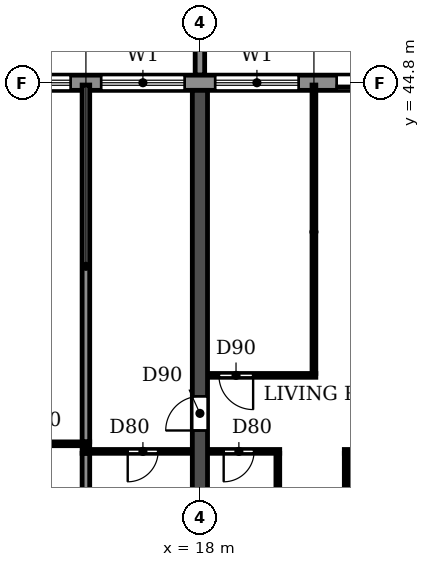
"""IFC4 building model, lengths in metres.
Left out: names, types, materials, properties, quantities, classifications, styles, units other than length and angle.
Written with IfcOpenShell. Run it as: python <this file> out.ifc"""

import sys

from ifc_helpers import new_model, si_unit, direction, frame, frame_2d, origin, place, context, subcontext, project, spatial, polyline, rectangle, outline, extrude, source, transform, mapped, element, fill, save


model = new_model("IFC4")
c1 = context("Model", 3, precision=1e-05, world=origin(), true_north=direction((0.0, 1.0)))
c2 = subcontext(c1, "Body", "Model", "MODEL_VIEW")
j1 = project(units=[si_unit("LENGTHUNIT", "METRE"), si_unit("PLANEANGLEUNIT", "RADIAN")], contexts=[c1])
p1 = place(None, origin())
s1 = spatial("IfcSite", under=j1, at=p1, CompositionType="ELEMENT")
p2 = place(p1, origin())
s2 = spatial("IfcBuilding", under=s1, at=p2, CompositionType="ELEMENT")
p3 = place(p2, frame((0.0, 0.0, 43.2)))
s3 = spatial("IfcBuildingStorey", under=s2, at=p3, CompositionType="ELEMENT", Elevation=43.2)
p4 = place(p3, frame((18.0, 30.55, 0.0), z_axis=(0.0, 0.0, 1.0), x_axis=(0.0, 1.0, 0.0)))
e1 = element("IfcWall", 1, at=p4, inside=s3, PredefinedType="SHEAR", context=c2, shape_type="SweptSolid", body=[
    extrude(rectangle(XDim=14.05, YDim=0.4, at=frame_2d((7.025, 0.0))), origin(), (0.0, 0.0, 1.0), 3.05),
])
p5 = place(p4, frame((5.1, 0.0, 0.0)))
e2 = element("IfcOpeningElement", 2, at=p5, cuts=e1, PredefinedType="OPENING", context=c2, shape_type="SweptSolid", body=[
    extrude(rectangle(XDim=0.9, YDim=2.1, at=frame_2d((0.45, 1.05))), frame((0.0, 0.21, 0.0), z_axis=(0.0, -1.0, 0.0), x_axis=(1.0, 0.0, 0.0)), (0.0, 0.0, 1.0), 0.42),
])
p6 = place(p3, frame((97.317, 44.8, 0.0), z_axis=(0.0, 0.0, 1.0), x_axis=(-1.0, 0.0, 0.0)))
e3 = element("IfcWall", 3, at=p6, inside=s3, PredefinedType="STANDARD", context=c2, shape_type="SweptSolid", body=[
    extrude(rectangle(XDim=92.634, YDim=0.4, at=frame_2d((46.317, 0.0))), origin(), (0.0, 0.0, 1.0), 3.05),
])
p7 = place(p6, frame((88.917, 0.0, 0.0)))
e4 = element("IfcOpeningElement", 4, at=p7, cuts=e3, PredefinedType="OPENING", context=c2, shape_type="SweptSolid", body=[
    extrude(rectangle(XDim=1.8, YDim=2.4, at=frame_2d((0.9, 1.2))), frame((0.0, 0.21, 0.0), z_axis=(0.0, -1.0, 0.0), x_axis=(1.0, 0.0, 0.0)), (0.0, 0.0, 1.0), 0.42),
])
p8 = place(p6, frame((85.717, 0.0, 0.9)))
e5 = element("IfcOpeningElement", 5, at=p8, cuts=e3, PredefinedType="OPENING", context=c2, shape_type="SweptSolid", body=[
    extrude(rectangle(XDim=2.2, YDim=1.5, at=frame_2d((1.1, 0.75))), frame((0.0, 0.21, 0.0), z_axis=(0.0, -1.0, 0.0), x_axis=(1.0, 0.0, 0.0)), (0.0, 0.0, 1.0), 0.42),
])
p9 = place(p6, frame((82.717, 0.0, 0.9)))
e6 = element("IfcOpeningElement", 6, at=p9, cuts=e3, PredefinedType="OPENING", context=c2, shape_type="SweptSolid", body=[
    extrude(rectangle(XDim=2.2, YDim=1.5, at=frame_2d((1.1, 0.75))), frame((0.0, 0.21, 0.0), z_axis=(0.0, -1.0, 0.0), x_axis=(1.0, 0.0, 0.0)), (0.0, 0.0, 1.0), 0.42),
])
p10 = place(p6, frame((79.717, 0.0, 0.9)))
e7 = element("IfcOpeningElement", 7, at=p10, cuts=e3, PredefinedType="OPENING", context=c2, shape_type="SweptSolid", body=[
    extrude(rectangle(XDim=2.2, YDim=1.5, at=frame_2d((1.1, 0.75))), frame((0.0, 0.21, 0.0), z_axis=(0.0, -1.0, 0.0), x_axis=(1.0, 0.0, 0.0)), (0.0, 0.0, 1.0), 0.42),
])
p11 = place(p6, frame((76.717, 0.0, 0.9)))
e8 = element("IfcOpeningElement", 8, at=p11, cuts=e3, PredefinedType="OPENING", context=c2, shape_type="SweptSolid", body=[
    extrude(rectangle(XDim=2.2, YDim=1.5, at=frame_2d((1.1, 0.75))), frame((0.0, 0.21, 0.0), z_axis=(0.0, -1.0, 0.0), x_axis=(1.0, 0.0, 0.0)), (0.0, 0.0, 1.0), 0.42),
])
p12 = place(p6, frame((73.917, 0.0, 0.0)))
e9 = element("IfcOpeningElement", 9, at=p12, cuts=e3, PredefinedType="OPENING", context=c2, shape_type="SweptSolid", body=[
    extrude(rectangle(XDim=1.8, YDim=2.4, at=frame_2d((0.9, 1.2))), frame((0.0, 0.21, 0.0), z_axis=(0.0, -1.0, 0.0), x_axis=(1.0, 0.0, 0.0)), (0.0, 0.0, 1.0), 0.42),
])
p13 = place(p6, frame((70.717, 0.0, 0.9)))
e10 = element("IfcOpeningElement", 10, at=p13, cuts=e3, PredefinedType="OPENING", context=c2, shape_type="SweptSolid", body=[
    extrude(rectangle(XDim=2.2, YDim=1.5, at=frame_2d((1.1, 0.75))), frame((0.0, 0.21, 0.0), z_axis=(0.0, -1.0, 0.0), x_axis=(1.0, 0.0, 0.0)), (0.0, 0.0, 1.0), 0.42),
])
p14 = place(p6, frame((67.717, 0.0, 0.9)))
e11 = element("IfcOpeningElement", 11, at=p14, cuts=e3, PredefinedType="OPENING", context=c2, shape_type="SweptSolid", body=[
    extrude(rectangle(XDim=2.2, YDim=1.5, at=frame_2d((1.1, 0.75))), frame((0.0, 0.21, 0.0), z_axis=(0.0, -1.0, 0.0), x_axis=(1.0, 0.0, 0.0)), (0.0, 0.0, 1.0), 0.42),
])
p15 = place(p6, frame((64.717, 0.0, 0.9)))
e12 = element("IfcOpeningElement", 12, at=p15, cuts=e3, PredefinedType="OPENING", context=c2, shape_type="SweptSolid", body=[
    extrude(rectangle(XDim=2.2, YDim=1.5, at=frame_2d((1.1, 0.75))), frame((0.0, 0.21, 0.0), z_axis=(0.0, -1.0, 0.0), x_axis=(1.0, 0.0, 0.0)), (0.0, 0.0, 1.0), 0.42),
])
p16 = place(p6, frame((61.917, 0.0, 0.0)))
e13 = element("IfcOpeningElement", 13, at=p16, cuts=e3, PredefinedType="OPENING", context=c2, shape_type="SweptSolid", body=[
    extrude(rectangle(XDim=1.8, YDim=2.4, at=frame_2d((0.9, 1.2))), frame((0.0, 0.21, 0.0), z_axis=(0.0, -1.0, 0.0), x_axis=(1.0, 0.0, 0.0)), (0.0, 0.0, 1.0), 0.42),
])
p17 = place(p6, frame((58.717, 0.0, 0.9)))
e14 = element("IfcOpeningElement", 14, at=p17, cuts=e3, PredefinedType="OPENING", context=c2, shape_type="SweptSolid", body=[
    extrude(rectangle(XDim=2.2, YDim=1.5, at=frame_2d((1.1, 0.75))), frame((0.0, 0.21, 0.0), z_axis=(0.0, -1.0, 0.0), x_axis=(1.0, 0.0, 0.0)), (0.0, 0.0, 1.0), 0.42),
])
p18 = place(p6, frame((55.717, 0.0, 0.9)))
e15 = element("IfcOpeningElement", 15, at=p18, cuts=e3, PredefinedType="OPENING", context=c2, shape_type="SweptSolid", body=[
    extrude(rectangle(XDim=2.2, YDim=1.5, at=frame_2d((1.1, 0.75))), frame((0.0, 0.21, 0.0), z_axis=(0.0, -1.0, 0.0), x_axis=(1.0, 0.0, 0.0)), (0.0, 0.0, 1.0), 0.42),
])
p19 = place(p6, frame((52.717, 0.0, 0.9)))
e16 = element("IfcOpeningElement", 16, at=p19, cuts=e3, PredefinedType="OPENING", context=c2, shape_type="SweptSolid", body=[
    extrude(rectangle(XDim=2.2, YDim=1.5, at=frame_2d((1.1, 0.75))), frame((0.0, 0.21, 0.0), z_axis=(0.0, -1.0, 0.0), x_axis=(1.0, 0.0, 0.0)), (0.0, 0.0, 1.0), 0.42),
])
p20 = place(p6, frame((49.917, 0.0, 0.0)))
e17 = element("IfcOpeningElement", 17, at=p20, cuts=e3, PredefinedType="OPENING", context=c2, shape_type="SweptSolid", body=[
    extrude(rectangle(XDim=1.8, YDim=2.4, at=frame_2d((0.9, 1.2))), frame((0.0, 0.21, 0.0), z_axis=(0.0, -1.0, 0.0), x_axis=(1.0, 0.0, 0.0)), (0.0, 0.0, 1.0), 0.42),
])
p21 = place(p6, frame((46.717, 0.0, 0.9)))
e18 = element("IfcOpeningElement", 18, at=p21, cuts=e3, PredefinedType="OPENING", context=c2, shape_type="SweptSolid", body=[
    extrude(rectangle(XDim=2.2, YDim=1.5, at=frame_2d((1.1, 0.75))), frame((0.0, 0.21, 0.0), z_axis=(0.0, -1.0, 0.0), x_axis=(1.0, 0.0, 0.0)), (0.0, 0.0, 1.0), 0.42),
])
p22 = place(p6, frame((43.717, 0.0, 0.9)))
e19 = element("IfcOpeningElement", 19, at=p22, cuts=e3, PredefinedType="OPENING", context=c2, shape_type="SweptSolid", body=[
    extrude(rectangle(XDim=2.2, YDim=1.5, at=frame_2d((1.1, 0.75))), frame((0.0, 0.21, 0.0), z_axis=(0.0, -1.0, 0.0), x_axis=(1.0, 0.0, 0.0)), (0.0, 0.0, 1.0), 0.42),
])
p23 = place(p6, frame((40.717, 0.0, 0.9)))
e20 = element("IfcOpeningElement", 20, at=p23, cuts=e3, PredefinedType="OPENING", context=c2, shape_type="SweptSolid", body=[
    extrude(rectangle(XDim=2.2, YDim=1.5, at=frame_2d((1.1, 0.75))), frame((0.0, 0.21, 0.0), z_axis=(0.0, -1.0, 0.0), x_axis=(1.0, 0.0, 0.0)), (0.0, 0.0, 1.0), 0.42),
])
p24 = place(p6, frame((37.917, 0.0, 0.0)))
e21 = element("IfcOpeningElement", 21, at=p24, cuts=e3, PredefinedType="OPENING", context=c2, shape_type="SweptSolid", body=[
    extrude(rectangle(XDim=1.8, YDim=2.4, at=frame_2d((0.9, 1.2))), frame((0.0, 0.21, 0.0), z_axis=(0.0, -1.0, 0.0), x_axis=(1.0, 0.0, 0.0)), (0.0, 0.0, 1.0), 0.42),
])
p25 = place(p6, frame((34.717, 0.0, 0.9)))
e22 = element("IfcOpeningElement", 22, at=p25, cuts=e3, PredefinedType="OPENING", context=c2, shape_type="SweptSolid", body=[
    extrude(rectangle(XDim=2.2, YDim=1.5, at=frame_2d((1.1, 0.75))), frame((0.0, 0.21, 0.0), z_axis=(0.0, -1.0, 0.0), x_axis=(1.0, 0.0, 0.0)), (0.0, 0.0, 1.0), 0.42),
])
p26 = place(p6, frame((31.717, 0.0, 0.9)))
e23 = element("IfcOpeningElement", 23, at=p26, cuts=e3, PredefinedType="OPENING", context=c2, shape_type="SweptSolid", body=[
    extrude(rectangle(XDim=2.2, YDim=1.5, at=frame_2d((1.1, 0.75))), frame((0.0, 0.21, 0.0), z_axis=(0.0, -1.0, 0.0), x_axis=(1.0, 0.0, 0.0)), (0.0, 0.0, 1.0), 0.42),
])
p27 = place(p6, frame((28.717, 0.0, 0.9)))
e24 = element("IfcOpeningElement", 24, at=p27, cuts=e3, PredefinedType="OPENING", context=c2, shape_type="SweptSolid", body=[
    extrude(rectangle(XDim=2.2, YDim=1.5, at=frame_2d((1.1, 0.75))), frame((0.0, 0.21, 0.0), z_axis=(0.0, -1.0, 0.0), x_axis=(1.0, 0.0, 0.0)), (0.0, 0.0, 1.0), 0.42),
])
p28 = place(p6, frame((25.917, 0.0, 0.0)))
e25 = element("IfcOpeningElement", 25, at=p28, cuts=e3, PredefinedType="OPENING", context=c2, shape_type="SweptSolid", body=[
    extrude(rectangle(XDim=1.8, YDim=2.4, at=frame_2d((0.9, 1.2))), frame((0.0, 0.21, 0.0), z_axis=(0.0, -1.0, 0.0), x_axis=(1.0, 0.0, 0.0)), (0.0, 0.0, 1.0), 0.42),
])
p29 = place(p6, frame((22.917, 0.0, 0.0)))
e26 = element("IfcOpeningElement", 26, at=p29, cuts=e3, PredefinedType="OPENING", context=c2, shape_type="SweptSolid", body=[
    extrude(rectangle(XDim=1.8, YDim=2.4, at=frame_2d((0.9, 1.2))), frame((0.0, 0.21, 0.0), z_axis=(0.0, -1.0, 0.0), x_axis=(1.0, 0.0, 0.0)), (0.0, 0.0, 1.0), 0.42),
])
p30 = place(p6, frame((19.717, 0.0, 0.9)))
e27 = element("IfcOpeningElement", 27, at=p30, cuts=e3, PredefinedType="OPENING", context=c2, shape_type="SweptSolid", body=[
    extrude(rectangle(XDim=2.2, YDim=1.5, at=frame_2d((1.1, 0.75))), frame((0.0, 0.21, 0.0), z_axis=(0.0, -1.0, 0.0), x_axis=(1.0, 0.0, 0.0)), (0.0, 0.0, 1.0), 0.42),
])
p31 = place(p6, frame((16.717, 0.0, 0.9)))
e28 = element("IfcOpeningElement", 28, at=p31, cuts=e3, PredefinedType="OPENING", context=c2, shape_type="SweptSolid", body=[
    extrude(rectangle(XDim=2.2, YDim=1.5, at=frame_2d((1.1, 0.75))), frame((0.0, 0.21, 0.0), z_axis=(0.0, -1.0, 0.0), x_axis=(1.0, 0.0, 0.0)), (0.0, 0.0, 1.0), 0.42),
])
p32 = place(p6, frame((13.717, 0.0, 0.9)))
e29 = element("IfcOpeningElement", 29, at=p32, cuts=e3, PredefinedType="OPENING", context=c2, shape_type="SweptSolid", body=[
    extrude(rectangle(XDim=2.2, YDim=1.5, at=frame_2d((1.1, 0.75))), frame((0.0, 0.21, 0.0), z_axis=(0.0, -1.0, 0.0), x_axis=(1.0, 0.0, 0.0)), (0.0, 0.0, 1.0), 0.42),
])
p33 = place(p6, frame((10.717, 0.0, 0.9)))
e30 = element("IfcOpeningElement", 30, at=p33, cuts=e3, PredefinedType="OPENING", context=c2, shape_type="SweptSolid", body=[
    extrude(rectangle(XDim=2.2, YDim=1.5, at=frame_2d((1.1, 0.75))), frame((0.0, 0.21, 0.0), z_axis=(0.0, -1.0, 0.0), x_axis=(1.0, 0.0, 0.0)), (0.0, 0.0, 1.0), 0.42),
])
p34 = place(p6, frame((7.917, 0.0, 0.0)))
e31 = element("IfcOpeningElement", 31, at=p34, cuts=e3, PredefinedType="OPENING", context=c2, shape_type="SweptSolid", body=[
    extrude(rectangle(XDim=1.8, YDim=2.4, at=frame_2d((0.9, 1.2))), frame((0.0, 0.21, 0.0), z_axis=(0.0, -1.0, 0.0), x_axis=(1.0, 0.0, 0.0)), (0.0, 0.0, 1.0), 0.42),
])
p35 = place(p6, frame((4.717, 0.0, 0.9)))
e32 = element("IfcOpeningElement", 32, at=p35, cuts=e3, PredefinedType="OPENING", context=c2, shape_type="SweptSolid", body=[
    extrude(rectangle(XDim=2.2, YDim=1.5, at=frame_2d((1.1, 0.75))), frame((0.0, 0.21, 0.0), z_axis=(0.0, -1.0, 0.0), x_axis=(1.0, 0.0, 0.0)), (0.0, 0.0, 1.0), 0.42),
])
p36 = place(p6, frame((1.917, 0.0, 0.0)))
e33 = element("IfcOpeningElement", 33, at=p36, cuts=e3, PredefinedType="OPENING", context=c2, shape_type="SweptSolid", body=[
    extrude(rectangle(XDim=1.8, YDim=2.4, at=frame_2d((0.9, 1.2))), frame((0.0, 0.21, 0.0), z_axis=(0.0, -1.0, 0.0), x_axis=(1.0, 0.0, 0.0)), (0.0, 0.0, 1.0), 0.42),
])
m1 = source(origin(), c2, "Body", "SweptSolid", [
    extrude(outline(polyline([(0.0, 0.0), (0.25, 0.0), (0.25, 3.1), (0.0, 3.1), (0.0, 0.0)])), origin(), (0.0, 0.0, 1.0), 3.1),
])
p37 = place(p3, frame((17.875, 45.0, 0.0)))
e34 = element("IfcWall", 34, at=p37, inside=s3, PredefinedType="STANDARD", context=c2, shape_type="MappedRepresentation", body=[
    mapped(m1, transform((0.0, 0.0, 0.0))),
])
p38 = place(p3, frame((15.0, 30.56, 0.0), z_axis=(0.0, 0.0, 1.0), x_axis=(0.0, 1.0, 0.0)))
e35 = element("IfcWall", 35, at=p38, inside=s3, PredefinedType="PARTITIONING", context=c2, shape_type="SweptSolid", body=[
    extrude(rectangle(XDim=4.49, YDim=0.2, at=frame_2d((2.245, 0.0))), origin(), (0.0, 0.0, 1.0), 3.05),
])
p39 = place(p3, frame((15.0, 35.35, 0.0), z_axis=(0.0, 0.0, 1.0), x_axis=(0.0, 1.0, 0.0)))
e36 = element("IfcWall", 36, at=p39, inside=s3, PredefinedType="PARTITIONING", context=c2, shape_type="SweptSolid", body=[
    extrude(rectangle(XDim=9.39, YDim=0.2, at=frame_2d((4.695, 0.0))), origin(), (0.0, 0.0, 1.0), 3.05),
])
p40 = place(p3, frame((14.9, 35.1, 0.0), z_axis=(0.0, 0.0, 1.0), x_axis=(1.0, 0.0, 0.0)))
e37 = element("IfcWall", 37, at=p40, inside=s3, PredefinedType="PARTITIONING", context=c2, shape_type="SweptSolid", body=[
    extrude(rectangle(XDim=2.89, YDim=0.1, at=frame_2d((1.445, 0.0))), origin(), (0.0, 0.0, 1.0), 3.05),
])
p41 = place(p40, frame((1.2, 0.0, 0.0)))
e38 = element("IfcOpeningElement", 38, at=p41, cuts=e37, PredefinedType="OPENING", context=c2, shape_type="SweptSolid", body=[
    extrude(rectangle(XDim=0.8, YDim=2.1, at=frame_2d((0.4, 1.05))), frame((0.0, 0.06, 0.0), z_axis=(0.0, -1.0, 0.0), x_axis=(1.0, 0.0, 0.0)), (0.0, 0.0, 1.0), 0.12),
])
p42 = place(p3, frame((18.21, 35.1, 0.0), z_axis=(0.0, 0.0, 1.0), x_axis=(1.0, 0.0, 0.0)))
e39 = element("IfcWall", 39, at=p42, inside=s3, PredefinedType="PARTITIONING", context=c2, shape_type="SweptSolid", body=[
    extrude(rectangle(XDim=1.89, YDim=0.1, at=frame_2d((0.945, 0.0))), origin(), (0.0, 0.0, 1.0), 3.05),
])
p43 = place(p42, frame((0.415, 0.0, 0.0)))
e40 = element("IfcOpeningElement", 40, at=p43, cuts=e39, PredefinedType="OPENING", context=c2, shape_type="SweptSolid", body=[
    extrude(rectangle(XDim=0.8, YDim=2.1, at=frame_2d((0.4, 1.05))), frame((0.0, 0.06, 0.0), z_axis=(0.0, -1.0, 0.0), x_axis=(1.0, 0.0, 0.0)), (0.0, 0.0, 1.0), 0.12),
])
p44 = place(p3, frame((21.8, 35.1, 0.0), z_axis=(0.0, 0.0, 1.0), x_axis=(1.0, 0.0, 0.0)))
e41 = element("IfcWall", 41, at=p44, inside=s3, PredefinedType="PARTITIONING", context=c2, shape_type="SweptSolid", body=[
    extrude(rectangle(XDim=1.99, YDim=0.1, at=frame_2d((0.995, 0.0))), origin(), (0.0, 0.0, 1.0), 3.05),
])
p45 = place(p44, frame((0.675, 0.0, 0.0)))
e42 = element("IfcOpeningElement", 42, at=p45, cuts=e41, PredefinedType="OPENING", context=c2, shape_type="SweptSolid", body=[
    extrude(rectangle(XDim=0.9, YDim=2.1, at=frame_2d((0.45, 1.05))), frame((0.0, 0.06, 0.0), z_axis=(0.0, -1.0, 0.0), x_axis=(1.0, 0.0, 0.0)), (0.0, 0.0, 1.0), 0.12),
])
p46 = place(p3, frame((12.21, 35.3, 0.0), z_axis=(0.0, 0.0, 1.0), x_axis=(1.0, 0.0, 0.0)))
e43 = element("IfcWall", 43, at=p46, inside=s3, PredefinedType="PARTITIONING", context=c2, shape_type="SweptSolid", body=[
    extrude(rectangle(XDim=2.89, YDim=0.1, at=frame_2d((1.445, 0.0))), origin(), (0.0, 0.0, 1.0), 3.05),
])
p47 = place(p46, frame((0.89, 0.0, 0.0)))
e44 = element("IfcOpeningElement", 44, at=p47, cuts=e43, PredefinedType="OPENING", context=c2, shape_type="SweptSolid", body=[
    extrude(rectangle(XDim=0.8, YDim=2.1, at=frame_2d((0.4, 1.05))), frame((0.0, 0.06, 0.0), z_axis=(0.0, -1.0, 0.0), x_axis=(1.0, 0.0, 0.0)), (0.0, 0.0, 1.0), 0.12),
])
p48 = place(p3, frame((18.21, 37.1, 0.0), z_axis=(0.0, 0.0, 1.0), x_axis=(1.0, 0.0, 0.0)))
e45 = element("IfcWall", 45, at=p48, inside=s3, PredefinedType="PARTITIONING", context=c2, shape_type="SweptSolid", body=[
    extrude(rectangle(XDim=2.84, YDim=0.1, at=frame_2d((1.42, 0.0))), origin(), (0.0, 0.0, 1.0), 3.05),
])
p49 = place(p48, frame((0.29, 0.0, 0.0)))
e46 = element("IfcOpeningElement", 46, at=p49, cuts=e45, PredefinedType="OPENING", context=c2, shape_type="SweptSolid", body=[
    extrude(rectangle(XDim=0.9, YDim=2.1, at=frame_2d((0.45, 1.05))), frame((0.0, 0.06, 0.0), z_axis=(0.0, -1.0, 0.0), x_axis=(1.0, 0.0, 0.0)), (0.0, 0.0, 1.0), 0.12),
])
p50 = place(p3, frame((20.05, 30.56, 0.0), z_axis=(0.0, 0.0, 1.0), x_axis=(0.0, 1.0, 0.0)))
e47 = element("IfcWall", 47, at=p50, inside=s3, PredefinedType="PARTITIONING", context=c2, shape_type="SweptSolid", body=[
    extrude(rectangle(XDim=4.49, YDim=0.1, at=frame_2d((2.245, 0.0))), origin(), (0.0, 0.0, 1.0), 3.05),
])
p51 = place(p3, frame((21.0, 37.15, 0.0), z_axis=(0.0, 0.0, 1.0), x_axis=(0.0, 1.0, 0.0)))
e48 = element("IfcWall", 48, at=p51, inside=s3, PredefinedType="PARTITIONING", context=c2, shape_type="SweptSolid", body=[
    extrude(rectangle(XDim=7.59, YDim=0.1, at=frame_2d((3.795, 0.0))), origin(), (0.0, 0.0, 1.0), 3.05),
])
p52 = place(p3, frame((21.85, 30.56, 0.0), z_axis=(0.0, 0.0, 1.0), x_axis=(0.0, 1.0, 0.0)))
e49 = element("IfcWall", 49, at=p52, inside=s3, PredefinedType="PARTITIONING", context=c2, shape_type="SweptSolid", body=[
    extrude(rectangle(XDim=4.49, YDim=0.1, at=frame_2d((2.245, 0.0))), origin(), (0.0, 0.0, 1.0), 3.05),
])
p53 = place(p9, origin())
e50 = element("IfcWindow", 50, at=p53, inside=s3, PartitioningType="DOUBLE_PANEL_HORIZONTAL", PredefinedType="WINDOW", context=c2, shape_type="SweptSolid", body=[
    extrude(rectangle(XDim=2.2, YDim=1.5, at=frame_2d((1.1, 0.75))), frame((0.0, 0.03, 0.0), z_axis=(0.0, -1.0, 0.0), x_axis=(1.0, 0.0, 0.0)), (0.0, 0.0, 1.0), 0.06),
])
fill(e6, e50)
p54 = place(p10, origin())
e51 = element("IfcWindow", 51, at=p54, inside=s3, PartitioningType="DOUBLE_PANEL_HORIZONTAL", PredefinedType="WINDOW", context=c2, shape_type="SweptSolid", body=[
    extrude(rectangle(XDim=2.2, YDim=1.5, at=frame_2d((1.1, 0.75))), frame((0.0, 0.03, 0.0), z_axis=(0.0, -1.0, 0.0), x_axis=(1.0, 0.0, 0.0)), (0.0, 0.0, 1.0), 0.06),
])
fill(e7, e51)
p55 = place(p11, origin())
e52 = element("IfcWindow", 52, at=p55, inside=s3, PartitioningType="DOUBLE_PANEL_HORIZONTAL", PredefinedType="WINDOW", context=c2, shape_type="SweptSolid", body=[
    extrude(rectangle(XDim=2.2, YDim=1.5, at=frame_2d((1.1, 0.75))), frame((0.0, 0.03, 0.0), z_axis=(0.0, -1.0, 0.0), x_axis=(1.0, 0.0, 0.0)), (0.0, 0.0, 1.0), 0.06),
])
fill(e8, e52)
p56 = place(p12, origin())
e53 = element("IfcDoor", 53, at=p56, inside=s3, OperationType="DOUBLE_DOOR_SLIDING", PredefinedType="DOOR", context=c2, shape_type="SweptSolid", body=[
    extrude(rectangle(XDim=1.8, YDim=2.4, at=frame_2d((0.9, 1.2))), frame((0.0, 0.025, 0.0), z_axis=(0.0, -1.0, 0.0), x_axis=(1.0, 0.0, 0.0)), (0.0, 0.0, 1.0), 0.05),
])
fill(e9, e53)
p57 = place(p41, frame((0.8, 0.0, 0.0), z_axis=(0.0, 0.0, 1.0), x_axis=(-1.0, 0.0, 0.0)))
e54 = element("IfcDoor", 54, at=p57, inside=s3, OperationType="SINGLE_SWING_RIGHT", PredefinedType="DOOR", context=c2, shape_type="SweptSolid", body=[
    extrude(rectangle(XDim=0.8, YDim=2.1, at=frame_2d((0.4, 1.05))), frame((0.0, 0.025, 0.0), z_axis=(0.0, -1.0, 0.0), x_axis=(1.0, 0.0, 0.0)), (0.0, 0.0, 1.0), 0.05),
])
fill(e38, e54)
p58 = place(p5, origin())
e55 = element("IfcDoor", 55, at=p58, inside=s3, OperationType="SINGLE_SWING_LEFT", PredefinedType="DOOR", context=c2, shape_type="SweptSolid", body=[
    extrude(rectangle(XDim=0.9, YDim=2.1, at=frame_2d((0.45, 1.05))), frame((0.0, 0.025, 0.0), z_axis=(0.0, -1.0, 0.0), x_axis=(1.0, 0.0, 0.0)), (0.0, 0.0, 1.0), 0.05),
])
fill(e2, e55)
p59 = place(p49, frame((0.9, 0.0, 0.0), z_axis=(0.0, 0.0, 1.0), x_axis=(-1.0, 0.0, 0.0)))
e56 = element("IfcDoor", 56, at=p59, inside=s3, OperationType="SINGLE_SWING_LEFT", PredefinedType="DOOR", context=c2, shape_type="SweptSolid", body=[
    extrude(rectangle(XDim=0.9, YDim=2.1, at=frame_2d((0.45, 1.05))), frame((0.0, 0.025, 0.0), z_axis=(0.0, -1.0, 0.0), x_axis=(1.0, 0.0, 0.0)), (0.0, 0.0, 1.0), 0.05),
])
fill(e46, e56)
p60 = place(p43, frame((0.8, 0.0, 0.0), z_axis=(0.0, 0.0, 1.0), x_axis=(-1.0, 0.0, 0.0)))
e57 = element("IfcDoor", 57, at=p60, inside=s3, OperationType="SINGLE_SWING_RIGHT", PredefinedType="DOOR", context=c2, shape_type="SweptSolid", body=[
    extrude(rectangle(XDim=0.8, YDim=2.1, at=frame_2d((0.4, 1.05))), frame((0.0, 0.025, 0.0), z_axis=(0.0, -1.0, 0.0), x_axis=(1.0, 0.0, 0.0)), (0.0, 0.0, 1.0), 0.05),
])
fill(e40, e57)
save(model, sys.argv[1])
